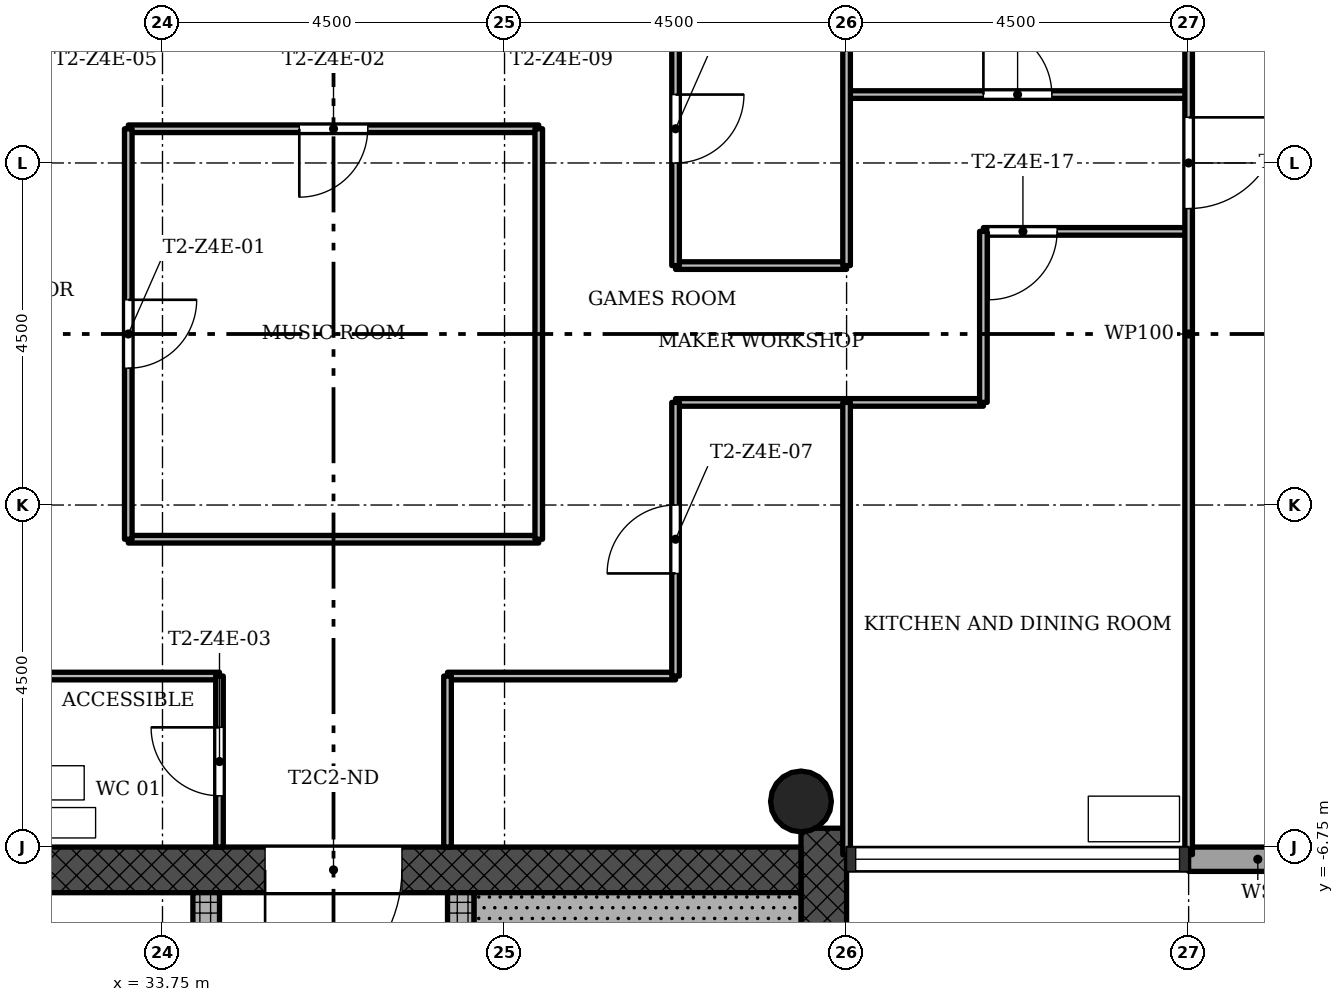
"""IFC4 building model, lengths in metres.
Left out: names, types, materials, properties, quantities, classifications, styles, units other than length and angle.
Written with IfcOpenShell. Run it as: python <this file> out.ifc"""

import sys

from ifc_helpers import new_model, si_unit, direction, frame, frame_2d, origin, origin_2d, place, context, subcontext, project, spatial, rectangle, hollow_circle, extrude, element, fill, save


model = new_model("IFC4")
c1 = context("Model", 3, precision=1e-05, world=origin(), true_north=direction((0.0, 1.0)))
c2 = subcontext(c1, "Body", "Model", "MODEL_VIEW")
j1 = project(units=[si_unit("LENGTHUNIT", "METRE"), si_unit("PLANEANGLEUNIT", "RADIAN")], contexts=[c1])
p1 = place(None, origin())
s1 = spatial("IfcSite", under=j1, at=p1, CompositionType="ELEMENT")
p2 = place(p1, origin())
s2 = spatial("IfcBuilding", under=s1, at=p2, CompositionType="ELEMENT")
p3 = place(p2, frame((0.0, 0.0, 206.2)))
s3 = spatial("IfcBuildingStorey", under=s2, at=p3, CompositionType="ELEMENT", Elevation=206.2)
p4 = place(p3, frame((42.45, -15.15, 0.0), z_axis=(0.0, 0.0, 1.0), x_axis=(0.0, 1.0, 0.0)))
e1 = element("IfcWall", 1, at=p4, inside=s3, PredefinedType="SHEAR", context=c2, shape_type="SweptSolid", body=[
    extrude(rectangle(XDim=8.648, YDim=0.6, at=frame_2d((4.324, 0.0))), origin(), (0.0, 0.0, 1.0), 3.4),
])
p5 = place(p3, frame((42.15, -7.05, 0.0), z_axis=(0.0, 0.0, 1.0), x_axis=(-1.0, 0.0, 0.0)))
e2 = element("IfcWall", 2, at=p5, inside=s3, PredefinedType="SHEAR", context=c2, shape_type="SweptSolid", body=[
    extrude(rectangle(XDim=12.9, YDim=0.6, at=frame_2d((6.45, 0.0))), origin(), (0.0, 0.0, 1.0), 3.4),
])
p6 = place(p5, frame((5.25, 0.0, 0.0)))
e3 = element("IfcOpeningElement", 3, at=p6, cuts=e2, PredefinedType="OPENING", context=c2, shape_type="SweptSolid", body=[
    extrude(rectangle(XDim=1.8, YDim=2.1, at=frame_2d((0.9, 1.05))), frame((0.0, 0.31, 0.0), z_axis=(0.0, -1.0, 0.0), x_axis=(1.0, 0.0, 0.0)), (0.0, 0.0, 1.0), 0.62),
])
p7 = place(p3, frame((34.325, -15.15, 0.0), z_axis=(0.0, 0.0, 1.0), x_axis=(0.0, 1.0, 0.0)))
e4 = element("IfcWall", 4, at=p7, inside=s3, PredefinedType="SHEAR", context=c2, shape_type="SweptSolid", body=[
    extrude(rectangle(XDim=7.8, YDim=0.35, at=frame_2d((3.9, 0.0))), origin(), (0.0, 0.0, 1.0), 3.4),
])
p8 = place(p7, frame((5.55, 0.0, 0.0)))
e5 = element("IfcOpeningElement", 5, at=p8, cuts=e4, PredefinedType="OPENING", context=c2, shape_type="SweptSolid", body=[
    extrude(rectangle(XDim=1.1, YDim=2.1, at=frame_2d((0.55, 1.05))), frame((0.0, 0.185, 0.0), z_axis=(0.0, -1.0, 0.0), x_axis=(1.0, 0.0, 0.0)), (0.0, 0.0, 1.0), 0.37),
])
p9 = place(p7, frame((1.2, 0.0, 0.0)))
e6 = element("IfcOpeningElement", 6, at=p9, cuts=e4, PredefinedType="OPENING", context=c2, shape_type="SweptSolid", body=[
    extrude(rectangle(XDim=1.1, YDim=2.1, at=frame_2d((0.55, 1.05))), frame((0.0, 0.185, 0.0), z_axis=(0.0, -1.0, 0.0), x_axis=(1.0, 0.0, 0.0)), (0.0, 0.0, 1.0), 0.37),
])
p10 = place(p7, frame((3.5, 0.0, 0.0)))
e7 = element("IfcOpeningElement", 7, at=p10, cuts=e4, PredefinedType="OPENING", context=c2, shape_type="SweptSolid", body=[
    extrude(rectangle(XDim=0.9, YDim=2.1, at=frame_2d((0.45, 1.05))), frame((0.0, 0.185, 0.0), z_axis=(0.0, -1.0, 0.0), x_axis=(1.0, 0.0, 0.0)), (0.0, 0.0, 1.0), 0.37),
])
p11 = place(p3, frame((37.675, -15.15, 0.0), z_axis=(0.0, 0.0, 1.0), x_axis=(0.0, 1.0, 0.0)))
e8 = element("IfcWall", 8, at=p11, inside=s3, PredefinedType="SHEAR", context=c2, shape_type="SweptSolid", body=[
    extrude(rectangle(XDim=7.8, YDim=0.35, at=frame_2d((3.9, 0.0))), origin(), (0.0, 0.0, 1.0), 3.4),
])
p12 = place(p11, frame((5.85, 0.0, 0.0)))
e9 = element("IfcOpeningElement", 9, at=p12, cuts=e8, PredefinedType="OPENING", context=c2, shape_type="SweptSolid", body=[
    extrude(rectangle(XDim=0.9, YDim=2.1, at=frame_2d((0.45, 1.05))), frame((0.0, 0.185, 0.0), z_axis=(0.0, -1.0, 0.0), x_axis=(1.0, 0.0, 0.0)), (0.0, 0.0, 1.0), 0.37),
])
p13 = place(p3, frame((42.15, -6.15, 0.0), z_axis=(0.0, 0.0, 1.0), x_axis=(1.0, 0.0, 0.0)))
e10 = element("IfcColumn", 10, at=p13, inside=s3, PredefinedType="COLUMN", context=c2, shape_type="SweptSolid", body=[
    extrude(hollow_circle(Radius=0.4, WallThickness=0.028, at=origin_2d()), origin(), (0.0, 0.0, 1.0), 3.4),
])
p14 = place(p3, frame((47.25, -6.91, -0.3), z_axis=(0.0, 0.0, 1.0), x_axis=(1.0, 0.0, 0.0)))
e11 = element("IfcWall", 11, at=p14, inside=s3, PredefinedType="STANDARD", context=c2, shape_type="SweptSolid", body=[
    extrude(rectangle(XDim=1.82, YDim=0.32, at=frame_2d((0.91, 0.0))), origin(), (0.0, 0.0, 1.0), 3.4),
])
for number, where, z_axis, x_axis in (
    (12, (40.5, -4.5, 0.0), (0.0, 0.0, 1.0), (-1.0, 0.0, 0.0)),
    (13, (34.5, -4.5, 0.0), (0.0, 0.0, 1.0), (-1.0, 0.0, 0.0)),
):
    element("IfcWall", number, at=place(p3, frame(where, z_axis=z_axis, x_axis=x_axis)), inside=s3, PredefinedType="PARTITIONING", context=c2, shape_type="SweptSolid", body=[
        extrude(rectangle(XDim=3.0, YDim=0.1, at=frame_2d((1.5, 0.0))), origin(), (0.0, 0.0, 1.0), 3.0),
    ])
p15 = place(p3, frame((38.7, -2.7, 0.0), z_axis=(0.0, 0.0, 1.0), x_axis=(-1.0, 0.0, 0.0)))
e14 = element("IfcWall", 14, at=p15, inside=s3, PredefinedType="PARTITIONING", context=c2, shape_type="SweptSolid", body=[
    extrude(rectangle(XDim=5.4, YDim=0.1, at=frame_2d((2.7, 0.0))), origin(), (0.0, 0.0, 1.0), 3.0),
])
p16 = place(p3, frame((44.55, -0.9, 0.0), z_axis=(0.0, 0.0, 1.0), x_axis=(-1.0, 0.0, 0.0)))
e15 = element("IfcWall", 15, at=p16, inside=s3, PredefinedType="PARTITIONING", context=c2, shape_type="SweptSolid", body=[
    extrude(rectangle(XDim=4.05, YDim=0.1, at=frame_2d((2.025, 0.0))), origin(), (0.0, 0.0, 1.0), 3.0),
])
p17 = place(p3, frame((42.75, 0.9, 0.0), z_axis=(0.0, 0.0, 1.0), x_axis=(-1.0, 0.0, 0.0)))
e16 = element("IfcWall", 16, at=p17, inside=s3, PredefinedType="PARTITIONING", context=c2, shape_type="SweptSolid", body=[
    extrude(rectangle(XDim=2.25, YDim=0.1, at=frame_2d((1.125, 0.0))), origin(), (0.0, 0.0, 1.0), 3.0),
])
p18 = place(p3, frame((47.25, 1.35, 0.0), z_axis=(0.0, 0.0, 1.0), x_axis=(-1.0, 0.0, 0.0)))
e17 = element("IfcWall", 17, at=p18, inside=s3, PredefinedType="PARTITIONING", context=c2, shape_type="SweptSolid", body=[
    extrude(rectangle(XDim=2.7, YDim=0.1, at=frame_2d((1.35, 0.0))), origin(), (0.0, 0.0, 1.0), 3.0),
])
p19 = place(p18, frame((1.73, 0.0, 0.0)))
e18 = element("IfcOpeningElement", 18, at=p19, cuts=e17, PredefinedType="OPENING", context=c2, shape_type="SweptSolid", body=[
    extrude(rectangle(XDim=0.9, YDim=2.1, at=frame_2d((0.45, 1.05))), frame((0.0, 0.06, 0.0), z_axis=(0.0, -1.0, 0.0), x_axis=(1.0, 0.0, 0.0)), (0.0, 0.0, 1.0), 0.12),
])
p20 = place(p3, frame((38.7, 2.7, 0.0), z_axis=(0.0, 0.0, 1.0), x_axis=(-1.0, 0.0, 0.0)))
e19 = element("IfcWall", 19, at=p20, inside=s3, PredefinedType="PARTITIONING", context=c2, shape_type="SweptSolid", body=[
    extrude(rectangle(XDim=5.4, YDim=0.1, at=frame_2d((2.7, 0.0))), origin(), (0.0, 0.0, 1.0), 3.0),
])
p21 = place(p20, frame((2.25, 0.0, 0.0)))
e20 = element("IfcOpeningElement", 20, at=p21, cuts=e19, PredefinedType="OPENING", context=c2, shape_type="SweptSolid", body=[
    extrude(rectangle(XDim=0.9, YDim=2.1, at=frame_2d((0.45, 1.05))), frame((0.0, 0.06, 0.0), z_axis=(0.0, -1.0, 0.0), x_axis=(1.0, 0.0, 0.0)), (0.0, 0.0, 1.0), 0.12),
])
p22 = place(p3, frame((47.25, 3.15, 0.0), z_axis=(0.0, 0.0, 1.0), x_axis=(-1.0, 0.0, 0.0)))
e21 = element("IfcWall", 21, at=p22, inside=s3, PredefinedType="PARTITIONING", context=c2, shape_type="SweptSolid", body=[
    extrude(rectangle(XDim=4.5, YDim=0.1, at=frame_2d((2.25, 0.0))), origin(), (0.0, 0.0, 1.0), 3.0),
])
p23 = place(p22, frame((1.8, 0.0, 0.0)))
e22 = element("IfcOpeningElement", 22, at=p23, cuts=e21, PredefinedType="OPENING", context=c2, shape_type="SweptSolid", body=[
    extrude(rectangle(XDim=0.9, YDim=2.1, at=frame_2d((0.45, 1.05))), frame((0.0, 0.06, 0.0), z_axis=(0.0, -1.0, 0.0), x_axis=(1.0, 0.0, 0.0)), (0.0, 0.0, 1.0), 0.12),
])
p24 = place(p3, frame((47.25, -6.85, 0.0), z_axis=(0.0, 0.0, 1.0), x_axis=(0.0, 1.0, 0.0)))
e23 = element("IfcWall", 23, at=p24, inside=s3, PredefinedType="PARTITIONING", context=c2, shape_type="SweptSolid", body=[
    extrude(rectangle(XDim=13.7, YDim=0.1, at=frame_2d((6.85, 0.0))), origin(), (0.0, 0.0, 1.0), 3.0),
])
p25 = place(p24, frame((8.5, 0.0, 0.0)))
e24 = element("IfcOpeningElement", 24, at=p25, cuts=e23, PredefinedType="OPENING", context=c2, shape_type="SweptSolid", body=[
    extrude(rectangle(XDim=1.2, YDim=2.1, at=frame_2d((0.6, 1.05))), frame((0.0, 0.06, 0.0), z_axis=(0.0, -1.0, 0.0), x_axis=(1.0, 0.0, 0.0)), (0.0, 0.0, 1.0), 0.12),
])
p26 = place(p3, frame((44.55, -0.9, 0.0), z_axis=(0.0, 0.0, 1.0), x_axis=(0.0, 1.0, 0.0)))
e25 = element("IfcWall", 25, at=p26, inside=s3, PredefinedType="PARTITIONING", context=c2, shape_type="SweptSolid", body=[
    extrude(rectangle(XDim=2.25, YDim=0.1, at=frame_2d((1.125, 0.0))), origin(), (0.0, 0.0, 1.0), 3.0),
])
for number, where, z_axis, x_axis in (
    (26, (42.75, -6.85, 0.0), (0.0, 0.0, 1.0), (0.0, 1.0, 0.0)),
    (27, (42.75, 0.9, 0.0), (0.0, 0.0, 1.0), (0.0, 1.0, 0.0)),
):
    element("IfcWall", number, at=place(p3, frame(where, z_axis=z_axis, x_axis=x_axis)), inside=s3, PredefinedType="PARTITIONING", context=c2, shape_type="SweptSolid", body=[
        extrude(rectangle(XDim=5.95, YDim=0.1, at=frame_2d((2.975, 0.0))), origin(), (0.0, 0.0, 1.0), 3.0),
    ])
p27 = place(p3, frame((40.5, -4.5, 0.0), z_axis=(0.0, 0.0, 1.0), x_axis=(0.0, 1.0, 0.0)))
e28 = element("IfcWall", 28, at=p27, inside=s3, PredefinedType="PARTITIONING", context=c2, shape_type="SweptSolid", body=[
    extrude(rectangle(XDim=3.6, YDim=0.1, at=frame_2d((1.8, 0.0))), origin(), (0.0, 0.0, 1.0), 3.0),
])
p28 = place(p27, frame((1.35, 0.0, 0.0)))
e29 = element("IfcOpeningElement", 29, at=p28, cuts=e28, PredefinedType="OPENING", context=c2, shape_type="SweptSolid", body=[
    extrude(rectangle(XDim=0.9, YDim=2.1, at=frame_2d((0.45, 1.05))), frame((0.0, 0.06, 0.0), z_axis=(0.0, -1.0, 0.0), x_axis=(1.0, 0.0, 0.0)), (0.0, 0.0, 1.0), 0.12),
])
p29 = place(p3, frame((40.5, 0.9, 0.0), z_axis=(0.0, 0.0, 1.0), x_axis=(0.0, 1.0, 0.0)))
e30 = element("IfcWall", 30, at=p29, inside=s3, PredefinedType="PARTITIONING", context=c2, shape_type="SweptSolid", body=[
    extrude(rectangle(XDim=3.6, YDim=0.1, at=frame_2d((1.8, 0.0))), origin(), (0.0, 0.0, 1.0), 3.0),
])
p30 = place(p29, frame((1.35, 0.0, 0.0)))
e31 = element("IfcOpeningElement", 31, at=p30, cuts=e30, PredefinedType="OPENING", context=c2, shape_type="SweptSolid", body=[
    extrude(rectangle(XDim=0.9, YDim=2.1, at=frame_2d((0.45, 1.05))), frame((0.0, 0.06, 0.0), z_axis=(0.0, -1.0, 0.0), x_axis=(1.0, 0.0, 0.0)), (0.0, 0.0, 1.0), 0.12),
])
p31 = place(p3, frame((38.7, -2.7, 0.0), z_axis=(0.0, 0.0, 1.0), x_axis=(0.0, 1.0, 0.0)))
e32 = element("IfcWall", 32, at=p31, inside=s3, PredefinedType="PARTITIONING", context=c2, shape_type="SweptSolid", body=[
    extrude(rectangle(XDim=5.4, YDim=0.1, at=frame_2d((2.7, 0.0))), origin(), (0.0, 0.0, 1.0), 3.0),
])
p32 = place(p3, frame((37.5, -6.75, 0.0), z_axis=(0.0, 0.0, 1.0), x_axis=(0.0, 1.0, 0.0)))
e33 = element("IfcWall", 33, at=p32, inside=s3, PredefinedType="PARTITIONING", context=c2, shape_type="SweptSolid", body=[
    extrude(rectangle(XDim=2.25, YDim=0.1, at=frame_2d((1.125, 0.0))), origin(), (0.0, 0.0, 1.0), 3.0),
])
p33 = place(p3, frame((34.5, -6.75, 0.0), z_axis=(0.0, 0.0, 1.0), x_axis=(0.0, 1.0, 0.0)))
e34 = element("IfcWall", 34, at=p33, inside=s3, PredefinedType="PARTITIONING", context=c2, shape_type="SweptSolid", body=[
    extrude(rectangle(XDim=2.25, YDim=0.1, at=frame_2d((1.125, 0.0))), origin(), (0.0, 0.0, 1.0), 3.0),
])
p34 = place(p33, frame((0.675, 0.0, 0.0)))
e35 = element("IfcOpeningElement", 35, at=p34, cuts=e34, PredefinedType="OPENING", context=c2, shape_type="SweptSolid", body=[
    extrude(rectangle(XDim=0.9, YDim=2.1, at=frame_2d((0.45, 1.05))), frame((0.0, 0.06, 0.0), z_axis=(0.0, -1.0, 0.0), x_axis=(1.0, 0.0, 0.0)), (0.0, 0.0, 1.0), 0.12),
])
p35 = place(p3, frame((33.3, -2.7, 0.0), z_axis=(0.0, 0.0, 1.0), x_axis=(0.0, 1.0, 0.0)))
e36 = element("IfcWall", 36, at=p35, inside=s3, PredefinedType="PARTITIONING", context=c2, shape_type="SweptSolid", body=[
    extrude(rectangle(XDim=5.4, YDim=0.1, at=frame_2d((2.7, 0.0))), origin(), (0.0, 0.0, 1.0), 3.0),
])
p36 = place(p35, frame((2.25, 0.0, 0.0)))
e37 = element("IfcOpeningElement", 37, at=p36, cuts=e36, PredefinedType="OPENING", context=c2, shape_type="SweptSolid", body=[
    extrude(rectangle(XDim=0.9, YDim=2.1, at=frame_2d((0.45, 1.05))), frame((0.0, 0.06, 0.0), z_axis=(0.0, -1.0, 0.0), x_axis=(1.0, 0.0, 0.0)), (0.0, 0.0, 1.0), 0.12),
])
p37 = place(p3, frame((37.85, -7.65, 0.0), z_axis=(0.0, 0.0, 1.0), x_axis=(1.0, 0.0, 0.0)))
e38 = element("IfcWall", 38, at=p37, inside=s3, PredefinedType="SHEAR", context=c2, shape_type="SweptSolid", body=[
    extrude(rectangle(XDim=4.3, YDim=0.6, at=frame_2d((2.15, 0.0))), origin(), (0.0, 0.0, 1.0), 3.4),
])
p38 = place(p36, origin())
e39 = element("IfcDoor", 39, at=p38, inside=s3, OperationType="SINGLE_SWING_RIGHT", PredefinedType="DOOR", context=c2, shape_type="SweptSolid", body=[
    extrude(rectangle(XDim=0.9, YDim=2.1, at=frame_2d((0.45, 1.05))), frame((0.0, 0.025, 0.0), z_axis=(0.0, -1.0, 0.0), x_axis=(1.0, 0.0, 0.0)), (0.0, 0.0, 1.0), 0.05),
])
fill(e37, e39)
p39 = place(p21, origin())
e40 = element("IfcDoor", 40, at=p39, inside=s3, OperationType="SINGLE_SWING_LEFT", PredefinedType="DOOR", context=c2, shape_type="SweptSolid", body=[
    extrude(rectangle(XDim=0.9, YDim=2.1, at=frame_2d((0.45, 1.05))), frame((0.0, 0.025, 0.0), z_axis=(0.0, -1.0, 0.0), x_axis=(1.0, 0.0, 0.0)), (0.0, 0.0, 1.0), 0.05),
])
fill(e20, e40)
p40 = place(p34, origin())
e41 = element("IfcDoor", 41, at=p40, inside=s3, OperationType="SINGLE_SWING_LEFT", PredefinedType="DOOR", context=c2, shape_type="SweptSolid", body=[
    extrude(rectangle(XDim=0.9, YDim=2.1, at=frame_2d((0.45, 1.05))), frame((0.0, 0.025, 0.0), z_axis=(0.0, -1.0, 0.0), x_axis=(1.0, 0.0, 0.0)), (0.0, 0.0, 1.0), 0.05),
])
fill(e35, e41)
p41 = place(p28, origin())
e42 = element("IfcDoor", 42, at=p41, inside=s3, OperationType="SINGLE_SWING_RIGHT", PredefinedType="DOOR", context=c2, shape_type="SweptSolid", body=[
    extrude(rectangle(XDim=0.9, YDim=2.1, at=frame_2d((0.45, 1.05))), frame((0.0, 0.025, 0.0), z_axis=(0.0, -1.0, 0.0), x_axis=(1.0, 0.0, 0.0)), (0.0, 0.0, 1.0), 0.05),
])
fill(e29, e42)
p42 = place(p30, origin())
e43 = element("IfcDoor", 43, at=p42, inside=s3, OperationType="SINGLE_SWING_RIGHT", PredefinedType="DOOR", context=c2, shape_type="SweptSolid", body=[
    extrude(rectangle(XDim=0.9, YDim=2.1, at=frame_2d((0.45, 1.05))), frame((0.0, 0.025, 0.0), z_axis=(0.0, -1.0, 0.0), x_axis=(1.0, 0.0, 0.0)), (0.0, 0.0, 1.0), 0.05),
])
fill(e31, e43)
p43 = place(p23, origin())
e44 = element("IfcDoor", 44, at=p43, inside=s3, OperationType="SINGLE_SWING_RIGHT", PredefinedType="DOOR", context=c2, shape_type="SweptSolid", body=[
    extrude(rectangle(XDim=0.9, YDim=2.1, at=frame_2d((0.45, 1.05))), frame((0.0, 0.025, 0.0), z_axis=(0.0, -1.0, 0.0), x_axis=(1.0, 0.0, 0.0)), (0.0, 0.0, 1.0), 0.05),
])
fill(e22, e44)
p44 = place(p19, origin())
e45 = element("IfcDoor", 45, at=p44, inside=s3, OperationType="SINGLE_SWING_LEFT", PredefinedType="DOOR", context=c2, shape_type="SweptSolid", body=[
    extrude(rectangle(XDim=0.9, YDim=2.1, at=frame_2d((0.45, 1.05))), frame((0.0, 0.025, 0.0), z_axis=(0.0, -1.0, 0.0), x_axis=(1.0, 0.0, 0.0)), (0.0, 0.0, 1.0), 0.05),
])
fill(e18, e45)
p45 = place(p25, origin())
e46 = element("IfcDoor", 46, at=p45, inside=s3, OperationType="SINGLE_SWING_RIGHT", PredefinedType="DOOR", context=c2, shape_type="SweptSolid", body=[
    extrude(rectangle(XDim=1.2, YDim=2.1, at=frame_2d((0.6, 1.05))), frame((0.0, 0.025, 0.0), z_axis=(0.0, -1.0, 0.0), x_axis=(1.0, 0.0, 0.0)), (0.0, 0.0, 1.0), 0.05),
])
fill(e24, e46)
p46 = place(p6, origin())
e47 = element("IfcDoor", 47, at=p46, inside=s3, OperationType="SINGLE_SWING_LEFT", PredefinedType="DOOR", context=c2, shape_type="SweptSolid", body=[
    extrude(rectangle(XDim=1.8, YDim=2.1, at=frame_2d((0.9, 1.05))), frame((0.0, 0.025, 0.0), z_axis=(0.0, -1.0, 0.0), x_axis=(1.0, 0.0, 0.0)), (0.0, 0.0, 1.0), 0.05),
])
fill(e3, e47)
save(model, sys.argv[1])
